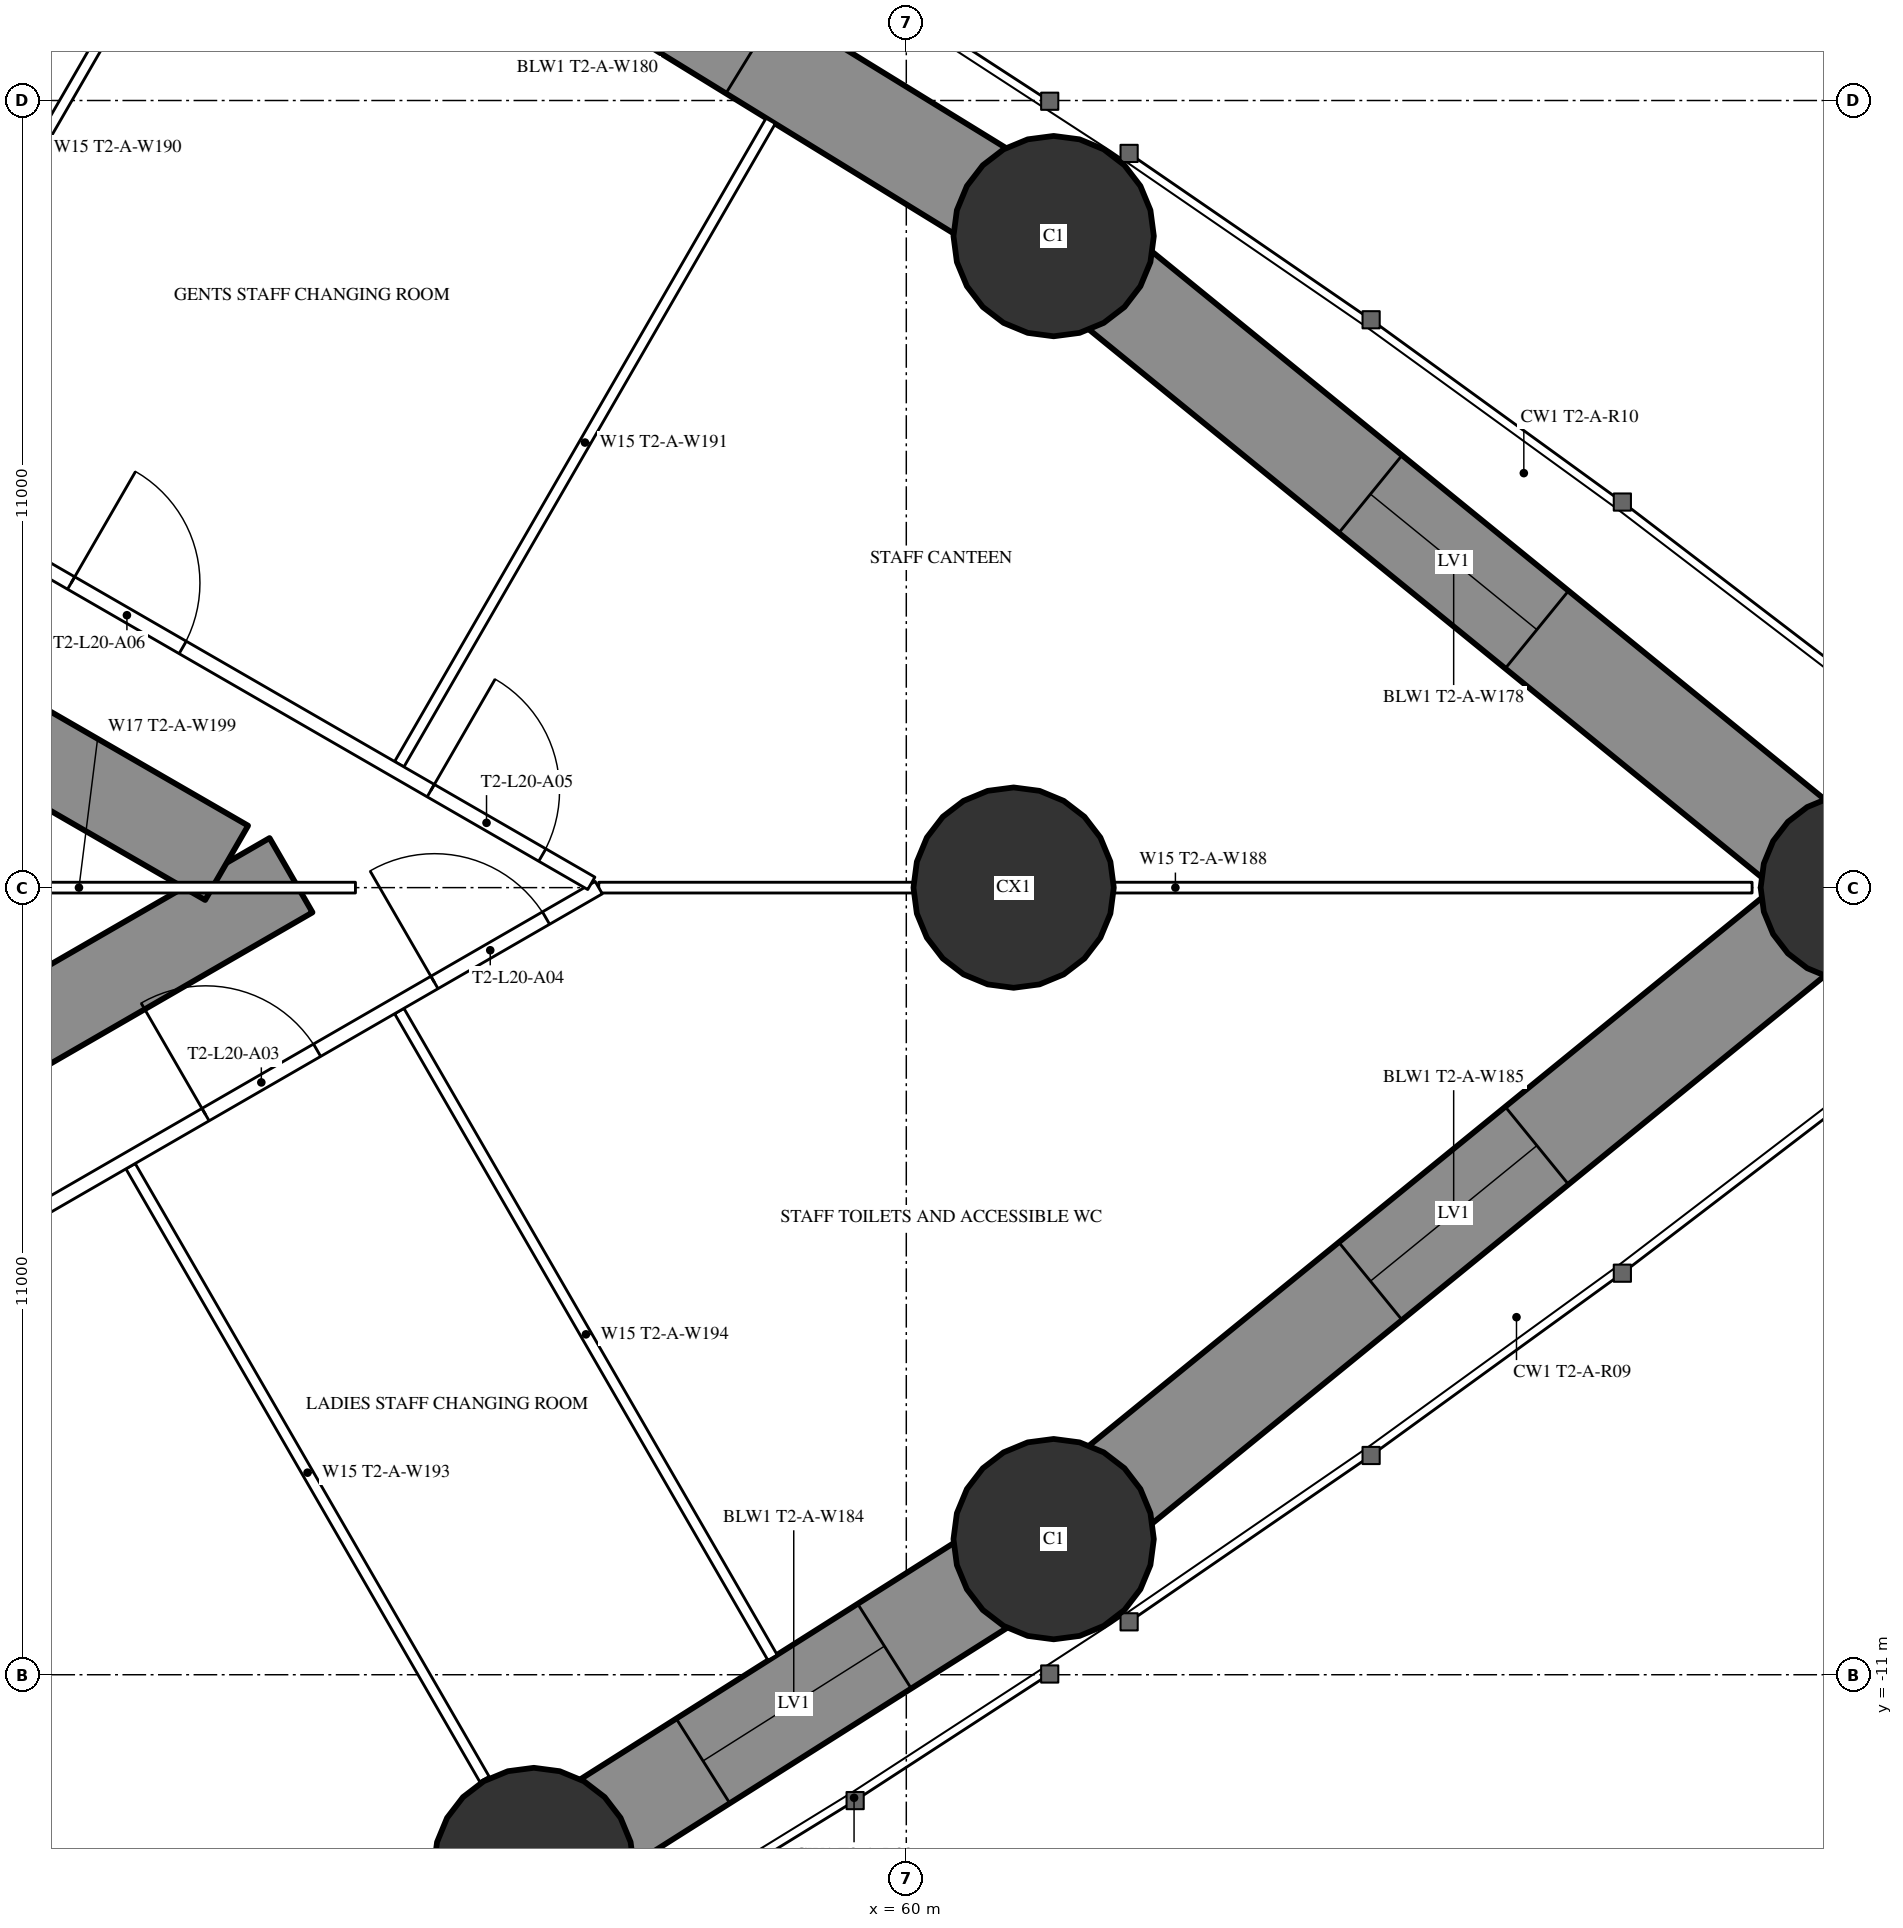
"""IFC4 building model, lengths in metres.
Left out: names, types, materials, properties, quantities, classifications, styles, units other than length and angle.
Written with IfcOpenShell. Run it as: python <this file> out.ifc"""

import sys

from ifc_helpers import new_model, si_unit, direction, frame, frame_2d, origin, origin_2d, place, context, subcontext, project, spatial, rectangle, hollow_circle, extrude, element, fill, save


model = new_model("IFC4")
c1 = context("Model", 3, precision=1e-05, world=origin(), true_north=direction((0.0, 1.0)))
c2 = subcontext(c1, "Body", "Model", "MODEL_VIEW")
j1 = project(units=[si_unit("LENGTHUNIT", "METRE"), si_unit("PLANEANGLEUNIT", "RADIAN")], contexts=[c1])
p1 = place(None, origin())
s1 = spatial("IfcSite", under=j1, at=p1, CompositionType="ELEMENT")
p2 = place(p1, origin())
s2 = spatial("IfcBuilding", under=s1, at=p2, CompositionType="ELEMENT")
p3 = place(p2, frame((0.0, 0.0, 77.5)))
s3 = spatial("IfcBuildingStorey", under=s2, at=p3, CompositionType="ELEMENT", Elevation=77.5)
p4 = place(p3, frame((73.239, 0.0, 0.0), z_axis=(0.0, 0.0, 1.0), x_axis=(1.0, 0.0, 0.0)))
e1 = element("IfcColumn", 1, at=p4, inside=s3, PredefinedType="COLUMN", context=c2, shape_type="SweptSolid", body=[
    extrude(hollow_circle(Radius=1.3, WallThickness=0.1, at=origin_2d()), origin(), (0.0, 0.0, 1.0), 3.5),
])
for number, where, z_axis, x_axis in (
    (2, (62.059, 9.105, 0.0), (0.0, 0.0, 1.0), (1.0, 0.0, 0.0)),
    (3, (54.795, -13.701, 0.0), (0.0, 0.0, 1.0), (1.0, 0.0, 0.0)),
    (4, (62.059, -9.105, 0.0), (0.0, 0.0, 1.0), (1.0, 0.0, 0.0)),
):
    element("IfcColumn", number, at=place(p3, frame(where, z_axis=z_axis, x_axis=x_axis)), inside=s3, PredefinedType="COLUMN", context=c2, shape_type="SweptSolid", body=[
        extrude(hollow_circle(Radius=1.4, WallThickness=0.12, at=origin_2d()), origin(), (0.0, 0.0, 1.0), 3.5),
    ])
p5 = place(p3, frame((61.5, 0.0, 0.0), z_axis=(0.0, 0.0, 1.0), x_axis=(1.0, 0.0, 0.0)))
e5 = element("IfcColumn", 5, at=p5, inside=s3, PredefinedType="COLUMN", context=c2, shape_type="SweptSolid", body=[
    extrude(hollow_circle(Radius=1.4, WallThickness=0.1, at=origin_2d()), origin(), (0.0, 0.0, 1.0), 3.5),
])
p6 = place(p3, frame((27.2, -13.8, 0.0), z_axis=(0.0, 0.0, 1.0), x_axis=(0.866027159892, 0.499996958321, 0.0)))
e6 = element("IfcWall", 6, at=p6, inside=s3, PredefinedType="SHEAR", context=c2, shape_type="SweptSolid", body=[
    extrude(rectangle(XDim=27.947, YDim=1.2, at=frame_2d((13.973, 0.0))), origin(), (0.0, 0.0, 1.0), 3.5),
])
p7 = place(p6, frame((5.65, 0.0, 0.0)))
e7 = element("IfcOpeningElement", 7, at=p7, cuts=e6, PredefinedType="OPENING", context=c2, shape_type="SweptSolid", body=[
    extrude(rectangle(XDim=1.0, YDim=2.2, at=frame_2d((0.5, 1.1))), frame((0.0, 0.61, 0.0), z_axis=(0.0, -1.0, 0.0), x_axis=(1.0, 0.0, 0.0)), (0.0, 0.0, 1.0), 1.22),
])
p8 = place(p6, frame((14.045, 0.0, 0.0)))
e8 = element("IfcOpeningElement", 8, at=p8, cuts=e6, PredefinedType="OPENING", context=c2, shape_type="SweptSolid", body=[
    extrude(rectangle(XDim=1.8, YDim=2.2, at=frame_2d((0.9, 1.1))), frame((0.0, 0.61, 0.0), z_axis=(0.0, -1.0, 0.0), x_axis=(1.0, 0.0, 0.0)), (0.0, 0.0, 1.0), 1.22),
])
p9 = place(p3, frame((27.2, 13.8, 0.0), z_axis=(0.0, 0.0, 1.0), x_axis=(0.866024515034, -0.500001539357, 0.0)))
e9 = element("IfcWall", 9, at=p9, inside=s3, PredefinedType="SHEAR", context=c2, shape_type="SweptSolid", body=[
    extrude(rectangle(XDim=26.907, YDim=1.2, at=frame_2d((13.454, 0.0))), origin(), (0.0, 0.0, 1.0), 3.5),
])
p10 = place(p9, frame((4.5, 0.0, 0.0)))
e10 = element("IfcOpeningElement", 10, at=p10, cuts=e9, PredefinedType="OPENING", context=c2, shape_type="SweptSolid", body=[
    extrude(rectangle(XDim=1.0, YDim=2.2, at=frame_2d((0.5, 1.1))), frame((0.0, 0.61, 0.0), z_axis=(0.0, -1.0, 0.0), x_axis=(1.0, 0.0, 0.0)), (0.0, 0.0, 1.0), 1.22),
])
p11 = place(p9, frame((12.545, 0.0, 0.0)))
e11 = element("IfcOpeningElement", 11, at=p11, cuts=e9, PredefinedType="OPENING", context=c2, shape_type="SweptSolid", body=[
    extrude(rectangle(XDim=1.8, YDim=2.2, at=frame_2d((0.9, 1.1))), frame((0.0, 0.61, 0.0), z_axis=(0.0, -1.0, 0.0), x_axis=(1.0, 0.0, 0.0)), (0.0, 0.0, 1.0), 1.22),
])
p12 = place(p3, frame((43.484, -19.886, 0.0), z_axis=(0.0, 0.0, 1.0), x_axis=(0.87736889738, 0.479816441893, 0.0)))
e12 = element("IfcWall", 12, at=p12, inside=s3, PredefinedType="SHEAR", context=c2, shape_type="SweptSolid", body=[
    extrude(rectangle(XDim=12.892, YDim=1.4, at=frame_2d((6.446, 0.0))), origin(), (0.0, 0.0, 1.0), 3.5),
])
p13 = place(p12, frame((4.946, 0.0, 0.6)))
e13 = element("IfcOpeningElement", 13, at=p13, cuts=e12, PredefinedType="OPENING", context=c2, shape_type="SweptSolid", body=[
    extrude(rectangle(XDim=3.0, YDim=1.2, at=frame_2d((1.5, 0.6))), frame((0.0, 0.71, 0.0), z_axis=(0.0, -1.0, 0.0), x_axis=(1.0, 0.0, 0.0)), (0.0, 0.0, 1.0), 1.42),
])
p14 = place(p3, frame((54.795, -13.701, 0.0), z_axis=(0.0, 0.0, 1.0), x_axis=(0.845078312276, 0.534642540508, 0.0)))
e14 = element("IfcWall", 14, at=p14, inside=s3, PredefinedType="SHEAR", context=c2, shape_type="SweptSolid", body=[
    extrude(rectangle(XDim=8.596, YDim=1.4, at=frame_2d((4.298, 0.0))), origin(), (0.0, 0.0, 1.0), 3.5),
])
p15 = place(p14, frame((2.798, 0.0, 0.6)))
e15 = element("IfcOpeningElement", 15, at=p15, cuts=e14, PredefinedType="OPENING", context=c2, shape_type="SweptSolid", body=[
    extrude(rectangle(XDim=3.0, YDim=1.2, at=frame_2d((1.5, 0.6))), frame((0.0, 0.71, 0.0), z_axis=(0.0, -1.0, 0.0), x_axis=(1.0, 0.0, 0.0)), (0.0, 0.0, 1.0), 1.42),
])
p16 = place(p3, frame((62.059, -9.105, 0.0), z_axis=(0.0, 0.0, 1.0), x_axis=(0.775390970005, 0.631481467372, 0.0)))
e16 = element("IfcWall", 16, at=p16, inside=s3, PredefinedType="SHEAR", context=c2, shape_type="SweptSolid", body=[
    extrude(rectangle(XDim=14.418, YDim=1.4, at=frame_2d((7.209, 0.0))), origin(), (0.0, 0.0, 1.0), 3.5),
])
p17 = place(p16, frame((5.709, 0.0, 0.6)))
e17 = element("IfcOpeningElement", 17, at=p17, cuts=e16, PredefinedType="OPENING", context=c2, shape_type="SweptSolid", body=[
    extrude(rectangle(XDim=3.0, YDim=1.2, at=frame_2d((1.5, 0.6))), frame((0.0, 0.71, 0.0), z_axis=(0.0, -1.0, 0.0), x_axis=(1.0, 0.0, 0.0)), (0.0, 0.0, 1.0), 1.42),
])
p18 = place(p3, frame((73.239, 0.0, 0.0), z_axis=(0.0, 0.0, 1.0), x_axis=(-0.775390970005, 0.631481467372, 0.0)))
e18 = element("IfcWall", 18, at=p18, inside=s3, PredefinedType="SHEAR", context=c2, shape_type="SweptSolid", body=[
    extrude(rectangle(XDim=14.418, YDim=1.4, at=frame_2d((7.209, 0.0))), origin(), (0.0, 0.0, 1.0), 3.5),
])
p19 = place(p18, frame((5.709, 0.0, 0.6)))
e19 = element("IfcOpeningElement", 19, at=p19, cuts=e18, PredefinedType="OPENING", context=c2, shape_type="SweptSolid", body=[
    extrude(rectangle(XDim=3.0, YDim=1.2, at=frame_2d((1.5, 0.6))), frame((0.0, 0.71, 0.0), z_axis=(0.0, -1.0, 0.0), x_axis=(1.0, 0.0, 0.0)), (0.0, 0.0, 1.0), 1.42),
])
p20 = place(p3, frame((62.059, 9.105, 0.0), z_axis=(0.0, 0.0, 1.0), x_axis=(-0.851815628025, 0.523841708775, 0.0)))
e20 = element("IfcWall", 20, at=p20, inside=s3, PredefinedType="SHEAR", context=c2, shape_type="SweptSolid", body=[
    extrude(rectangle(XDim=12.892, YDim=1.4, at=frame_2d((6.446, 0.0))), origin(), (0.0, 0.0, 1.0), 3.5),
])
p21 = place(p20, frame((4.946, 0.0, 0.6)))
e21 = element("IfcOpeningElement", 21, at=p21, cuts=e20, PredefinedType="OPENING", context=c2, shape_type="SweptSolid", body=[
    extrude(rectangle(XDim=3.0, YDim=1.2, at=frame_2d((1.5, 0.6))), frame((0.0, 0.71, 0.0), z_axis=(0.0, -1.0, 0.0), x_axis=(1.0, 0.0, 0.0)), (0.0, 0.0, 1.0), 1.42),
])
p22 = place(p3, frame((49.159, -3.893, 0.0), z_axis=(0.0, 0.0, 1.0), x_axis=(0.499998773722, -0.866026111775, 0.0)))
e22 = element("IfcWall", 22, at=p22, inside=s3, PredefinedType="PARTITIONING", context=c2, shape_type="SweptSolid", body=[
    extrude(rectangle(XDim=9.892, YDim=0.15, at=frame_2d((4.946, 0.0))), origin(), (0.0, 0.0, 1.0), 2.05),
])
p23 = place(p3, frame((52.915, -1.725, 0.0), z_axis=(0.0, 0.0, 1.0), x_axis=(0.499991830914, -0.866030120157, 0.0)))
e23 = element("IfcWall", 23, at=p23, inside=s3, PredefinedType="PARTITIONING", context=c2, shape_type="SweptSolid", body=[
    extrude(rectangle(XDim=10.434, YDim=0.15, at=frame_2d((5.217, 0.0))), origin(), (0.0, 0.0, 1.0), 3.25),
])
p24 = place(p3, frame((45.403, 6.062, 0.0), z_axis=(0.0, 0.0, 1.0), x_axis=(0.500013434677, 0.866017647131, 0.0)))
e24 = element("IfcWall", 24, at=p24, inside=s3, PredefinedType="PARTITIONING", context=c2, shape_type="SweptSolid", body=[
    extrude(rectangle(XDim=9.902, YDim=0.15, at=frame_2d((4.951, 0.0))), origin(), (0.0, 0.0, 1.0), 2.05),
])
p25 = place(p3, frame((52.915, 1.725, 0.0), z_axis=(0.0, 0.0, 1.0), x_axis=(0.499986436127, 0.866033234748, 0.0)))
e25 = element("IfcWall", 25, at=p25, inside=s3, PredefinedType="PARTITIONING", context=c2, shape_type="SweptSolid", body=[
    extrude(rectangle(XDim=10.381, YDim=0.15, at=frame_2d((5.19, 0.0))), origin(), (0.0, 0.0, 1.0), 3.25),
])
p26 = place(p3, frame((55.702, 0.0, 0.0), z_axis=(0.0, 0.0, 1.0), x_axis=(1.0, 0.0, 0.0)))
e26 = element("IfcWall", 26, at=p26, inside=s3, PredefinedType="PARTITIONING", context=c2, shape_type="SweptSolid", body=[
    extrude(rectangle(XDim=16.117, YDim=0.15, at=frame_2d((8.059, 0.0))), origin(), (0.0, 0.0, 1.0), 2.05),
])
p27 = place(p3, frame((37.96, -10.243, 0.0), z_axis=(0.0, 0.0, 1.0), x_axis=(0.866026429433, 0.499998223521, 0.0)))
e27 = element("IfcWall", 27, at=p27, inside=s3, PredefinedType="PARTITIONING", context=c2, shape_type="SweptSolid", body=[
    extrude(rectangle(XDim=20.487, YDim=0.2, at=frame_2d((10.243, 0.0))), origin(), (0.0, 0.0, 1.0), 3.25),
])
p28 = place(p27, frame((14.142, 0.0, 0.0)))
e28 = element("IfcOpeningElement", 28, at=p28, cuts=e27, PredefinedType="OPENING", context=c2, shape_type="SweptSolid", body=[
    extrude(rectangle(XDim=1.8, YDim=2.2, at=frame_2d((0.9, 1.1))), frame((0.0, 0.11, 0.0), z_axis=(0.0, -1.0, 0.0), x_axis=(1.0, 0.0, 0.0)), (0.0, 0.0, 1.0), 0.22),
])
p29 = place(p27, frame((17.836, 0.0, 0.0)))
e29 = element("IfcOpeningElement", 29, at=p29, cuts=e27, PredefinedType="OPENING", context=c2, shape_type="SweptSolid", body=[
    extrude(rectangle(XDim=1.8, YDim=2.04, at=frame_2d((0.9, 1.02))), frame((0.0, 0.11, 0.0), z_axis=(0.0, -1.0, 0.0), x_axis=(1.0, 0.0, 0.0)), (0.0, 0.0, 1.0), 0.22),
])
p30 = place(p27, frame((5.55, 0.0, 0.0)))
e30 = element("IfcOpeningElement", 30, at=p30, cuts=e27, PredefinedType="OPENING", context=c2, shape_type="SweptSolid", body=[
    extrude(rectangle(XDim=2.0, YDim=2.4, at=frame_2d((1.0, 1.2))), frame((0.0, 0.11, 0.0), z_axis=(0.0, -1.0, 0.0), x_axis=(1.0, 0.0, 0.0)), (0.0, 0.0, 1.0), 0.22),
])
p31 = place(p3, frame((36.834, 10.894, 0.0), z_axis=(0.0, 0.0, 1.0), x_axis=(0.866028157229, -0.499995230863, 0.0)))
e31 = element("IfcWall", 31, at=p31, inside=s3, PredefinedType="PARTITIONING", context=c2, shape_type="SweptSolid", body=[
    extrude(rectangle(XDim=21.667, YDim=0.2, at=frame_2d((10.833, 0.0))), origin(), (0.0, 0.0, 1.0), 3.25),
])
p32 = place(p31, frame((19.076, 0.0, 0.0)))
e32 = element("IfcOpeningElement", 32, at=p32, cuts=e31, PredefinedType="OPENING", context=c2, shape_type="SweptSolid", body=[
    extrude(rectangle(XDim=1.8, YDim=2.04, at=frame_2d((0.9, 1.02))), frame((0.0, 0.11, 0.0), z_axis=(0.0, -1.0, 0.0), x_axis=(1.0, 0.0, 0.0)), (0.0, 0.0, 1.0), 0.22),
])
p33 = place(p31, frame((13.274, 0.0, 0.0)))
e33 = element("IfcOpeningElement", 33, at=p33, cuts=e31, PredefinedType="OPENING", context=c2, shape_type="SweptSolid", body=[
    extrude(rectangle(XDim=1.8, YDim=2.2, at=frame_2d((0.9, 1.1))), frame((0.0, 0.11, 0.0), z_axis=(0.0, -1.0, 0.0), x_axis=(1.0, 0.0, 0.0)), (0.0, 0.0, 1.0), 0.22),
])
p34 = place(p31, frame((4.602, 0.0, 0.0)))
e34 = element("IfcOpeningElement", 34, at=p34, cuts=e31, PredefinedType="OPENING", context=c2, shape_type="SweptSolid", body=[
    extrude(rectangle(XDim=1.8, YDim=2.2, at=frame_2d((0.9, 1.1))), frame((0.0, 0.11, 0.0), z_axis=(0.0, -1.0, 0.0), x_axis=(1.0, 0.0, 0.0)), (0.0, 0.0, 1.0), 0.22),
])
p35 = place(p3, frame((44.575, 0.0, 0.0), z_axis=(0.0, 0.0, 1.0), x_axis=(1.0, 0.0, 0.0)))
e35 = element("IfcWall", 35, at=p35, inside=s3, PredefinedType="PARTITIONING", context=c2, shape_type="SweptSolid", body=[
    extrude(rectangle(XDim=7.727, YDim=0.15, at=frame_2d((3.864, 0.0))), origin(), (0.0, 0.0, 1.0), 2.05),
])
p36 = place(p15, origin())
e36 = element("IfcWindow", 36, at=p36, inside=s3, PartitioningType="SINGLE_PANEL", PredefinedType="WINDOW", context=c2, shape_type="SweptSolid", body=[
    extrude(rectangle(XDim=3.0, YDim=1.2, at=frame_2d((1.5, 0.6))), frame((0.0, 0.03, 0.0), z_axis=(0.0, -1.0, 0.0), x_axis=(1.0, 0.0, 0.0)), (0.0, 0.0, 1.0), 0.06),
])
fill(e15, e36)
p37 = place(p17, origin())
e37 = element("IfcWindow", 37, at=p37, inside=s3, PartitioningType="SINGLE_PANEL", PredefinedType="WINDOW", context=c2, shape_type="SweptSolid", body=[
    extrude(rectangle(XDim=3.0, YDim=1.2, at=frame_2d((1.5, 0.6))), frame((0.0, 0.03, 0.0), z_axis=(0.0, -1.0, 0.0), x_axis=(1.0, 0.0, 0.0)), (0.0, 0.0, 1.0), 0.06),
])
fill(e17, e37)
p38 = place(p19, origin())
e38 = element("IfcWindow", 38, at=p38, inside=s3, PartitioningType="SINGLE_PANEL", PredefinedType="WINDOW", context=c2, shape_type="SweptSolid", body=[
    extrude(rectangle(XDim=3.0, YDim=1.2, at=frame_2d((1.5, 0.6))), frame((0.0, 0.03, 0.0), z_axis=(0.0, -1.0, 0.0), x_axis=(1.0, 0.0, 0.0)), (0.0, 0.0, 1.0), 0.06),
])
fill(e19, e38)
p39 = place(p21, origin())
e39 = element("IfcWindow", 39, at=p39, inside=s3, PartitioningType="SINGLE_PANEL", PredefinedType="WINDOW", context=c2, shape_type="SweptSolid", body=[
    extrude(rectangle(XDim=3.0, YDim=1.2, at=frame_2d((1.5, 0.6))), frame((0.0, 0.03, 0.0), z_axis=(0.0, -1.0, 0.0), x_axis=(1.0, 0.0, 0.0)), (0.0, 0.0, 1.0), 0.06),
])
fill(e21, e39)
p40 = place(p28, origin())
e40 = element("IfcDoor", 40, at=p40, inside=s3, OperationType="DOUBLE_DOOR_SINGLE_SWING", PredefinedType="DOOR", context=c2, shape_type="SweptSolid", body=[
    extrude(rectangle(XDim=1.8, YDim=2.2, at=frame_2d((0.9, 1.1))), frame((0.0, 0.025, 0.0), z_axis=(0.0, -1.0, 0.0), x_axis=(1.0, 0.0, 0.0)), (0.0, 0.0, 1.0), 0.05),
])
fill(e28, e40)
p41 = place(p29, origin())
e41 = element("IfcDoor", 41, at=p41, inside=s3, OperationType="DOUBLE_DOOR_SINGLE_SWING", PredefinedType="DOOR", context=c2, shape_type="SweptSolid", body=[
    extrude(rectangle(XDim=1.8, YDim=2.04, at=frame_2d((0.9, 1.02))), frame((0.0, 0.025, 0.0), z_axis=(0.0, -1.0, 0.0), x_axis=(1.0, 0.0, 0.0)), (0.0, 0.0, 1.0), 0.05),
])
fill(e29, e41)
p42 = place(p32, origin())
e42 = element("IfcDoor", 42, at=p42, inside=s3, OperationType="DOUBLE_DOOR_SINGLE_SWING", PredefinedType="DOOR", context=c2, shape_type="SweptSolid", body=[
    extrude(rectangle(XDim=1.8, YDim=2.04, at=frame_2d((0.9, 1.02))), frame((0.0, 0.025, 0.0), z_axis=(0.0, -1.0, 0.0), x_axis=(1.0, 0.0, 0.0)), (0.0, 0.0, 1.0), 0.05),
])
fill(e32, e42)
p43 = place(p33, origin())
e43 = element("IfcDoor", 43, at=p43, inside=s3, OperationType="DOUBLE_DOOR_SINGLE_SWING", PredefinedType="DOOR", context=c2, shape_type="SweptSolid", body=[
    extrude(rectangle(XDim=1.8, YDim=2.2, at=frame_2d((0.9, 1.1))), frame((0.0, 0.025, 0.0), z_axis=(0.0, -1.0, 0.0), x_axis=(1.0, 0.0, 0.0)), (0.0, 0.0, 1.0), 0.05),
])
fill(e33, e43)
save(model, sys.argv[1])
